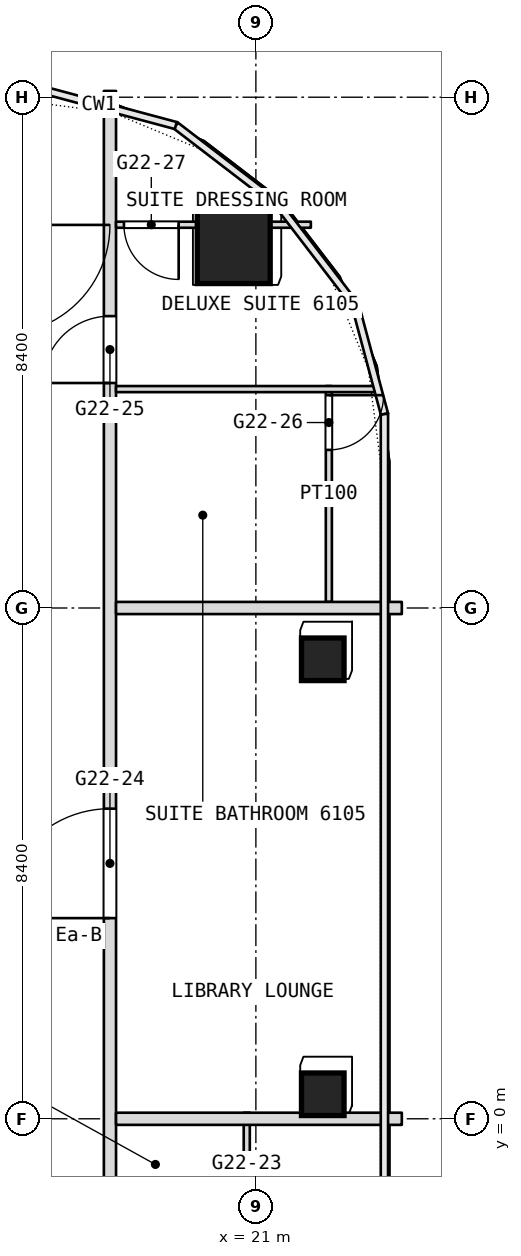
"""IFC4 building model, lengths in metres.
Left out: names, types, materials, properties, quantities, classifications, styles, units other than length and angle.
Written with IfcOpenShell. Run it as: python <this file> out.ifc"""

import sys

from ifc_helpers import new_model, si_unit, direction, frame, frame_2d, origin, origin_2d, place, context, subcontext, project, spatial, rectangle, extrude, element, fill, save


model = new_model("IFC4")
c1 = context("Model", 3, precision=1e-05, world=origin(), true_north=direction((0.0, 1.0)))
c2 = subcontext(c1, "Body", "Model", "MODEL_VIEW")
j1 = project(units=[si_unit("LENGTHUNIT", "METRE"), si_unit("PLANEANGLEUNIT", "RADIAN")], contexts=[c1])
p1 = place(None, origin())
s1 = spatial("IfcSite", under=j1, at=p1, CompositionType="ELEMENT")
p2 = place(p1, origin())
s2 = spatial("IfcBuilding", under=s1, at=p2, CompositionType="ELEMENT")
p3 = place(p2, frame((0.0, 0.0, 266.9)))
s3 = spatial("IfcBuildingStorey", under=s2, at=p3, CompositionType="ELEMENT", Elevation=266.9)
p4 = place(p3, frame((20.635, 14.335, 0.0), z_axis=(0.0, 0.0, 1.0), x_axis=(1.0, 0.0, 0.0)))
e1 = element("IfcColumn", 1, at=p4, inside=s3, PredefinedType="COLUMN", context=c2, shape_type="SweptSolid", body=[
    extrude(rectangle(XDim=1.2, YDim=1.2, at=origin_2d()), origin(), (0.0, 0.0, 1.0), 3.6),
])
for number, where, z_axis, x_axis in (
    (2, (22.1, 7.556, 0.0), (0.0, 0.0, 1.0), (1.0, 0.0, 0.0)),
    (3, (22.1, 0.403, 0.0), (0.0, 0.0, 1.0), (1.0, 0.0, 0.0)),
):
    element("IfcColumn", number, at=place(p3, frame(where, z_axis=z_axis, x_axis=x_axis)), inside=s3, PredefinedType="COLUMN", context=c2, shape_type="SweptSolid", body=[
        extrude(rectangle(XDim=0.7, YDim=0.7, at=origin_2d()), origin(), (0.0, 0.0, 1.0), 3.6),
    ])
p5 = place(p3, frame((22.2, 8.5, 0.0), z_axis=(0.0, 0.0, 1.0), x_axis=(0.0, 1.0, 0.0)))
e4 = element("IfcWall", 4, at=p5, inside=s3, PredefinedType="PARTITIONING", context=c2, shape_type="SweptSolid", body=[
    extrude(rectangle(XDim=3.55, YDim=0.1, at=frame_2d((1.775, 0.0))), origin(), (0.0, 0.0, 1.0), 3.0),
])
p6 = place(p5, frame((2.5, 0.0, 0.0)))
e5 = element("IfcOpeningElement", 5, at=p6, cuts=e4, PredefinedType="OPENING", context=c2, shape_type="SweptSolid", body=[
    extrude(rectangle(XDim=0.9, YDim=2.1, at=frame_2d((0.45, 1.05))), frame((0.0, 0.05, 0.0), z_axis=(0.0, -1.0, 0.0), x_axis=(1.0, 0.0, 0.0)), (0.0, 0.0, 1.0), 0.1),
])
p7 = place(p3, frame((20.85, -2.35, 0.0), z_axis=(0.0, 0.0, 1.0), x_axis=(0.0, 1.0, 0.0)))
e6 = element("IfcWall", 6, at=p7, inside=s3, PredefinedType="PARTITIONING", context=c2, shape_type="SweptSolid", body=[
    extrude(rectangle(XDim=2.45, YDim=0.1, at=frame_2d((1.225, 0.0))), origin(), (0.0, 0.0, 1.0), 3.34),
])
p8 = place(p7, frame((0.15, 0.0, 0.0)))
e7 = element("IfcOpeningElement", 7, at=p8, cuts=e6, PredefinedType="OPENING", context=c2, shape_type="SweptSolid", body=[
    extrude(rectangle(XDim=0.9, YDim=2.1, at=frame_2d((0.45, 1.05))), frame((0.0, 0.05, 0.0), z_axis=(0.0, -1.0, 0.0), x_axis=(1.0, 0.0, 0.0)), (0.0, 0.0, 1.0), 0.1),
])
p9 = place(p3, frame((18.6, -31.794, 0.0), z_axis=(0.0, 0.0, 1.0), x_axis=(0.0, 1.0, 0.0)))
e8 = element("IfcWall", 8, at=p9, inside=s3, PredefinedType="PARTITIONING", context=c2, shape_type="SweptSolid", body=[
    extrude(rectangle(XDim=48.697, YDim=0.2, at=frame_2d((24.349, 0.0))), origin(), (0.0, 0.0, 1.0), 3.34),
])
p10 = place(p9, frame((7.097, 0.0, 0.0)))
e9 = element("IfcOpeningElement", 9, at=p10, cuts=e8, PredefinedType="OPENING", context=c2, shape_type="SweptSolid", body=[
    extrude(rectangle(XDim=1.1, YDim=2.1, at=frame_2d((0.55, 1.05))), frame((0.0, 0.1, 0.0), z_axis=(0.0, -1.0, 0.0), x_axis=(1.0, 0.0, 0.0)), (0.0, 0.0, 1.0), 0.2),
])
p11 = place(p9, frame((18.594, 0.0, 0.0)))
e10 = element("IfcOpeningElement", 10, at=p11, cuts=e8, PredefinedType="OPENING", context=c2, shape_type="SweptSolid", body=[
    extrude(rectangle(XDim=1.1, YDim=2.1, at=frame_2d((0.55, 1.05))), frame((0.0, 0.1, 0.0), z_axis=(0.0, -1.0, 0.0), x_axis=(1.0, 0.0, 0.0)), (0.0, 0.0, 1.0), 0.2),
])
p12 = place(p9, frame((26.194, 0.0, 0.0)))
e11 = element("IfcOpeningElement", 11, at=p12, cuts=e8, PredefinedType="OPENING", context=c2, shape_type="SweptSolid", body=[
    extrude(rectangle(XDim=1.0, YDim=2.1, at=frame_2d((0.5, 1.05))), frame((0.0, 0.1, 0.0), z_axis=(0.0, -1.0, 0.0), x_axis=(1.0, 0.0, 0.0)), (0.0, 0.0, 1.0), 0.2),
])
p13 = place(p9, frame((27.994, 0.0, 0.0)))
e12 = element("IfcOpeningElement", 12, at=p13, cuts=e8, PredefinedType="OPENING", context=c2, shape_type="SweptSolid", body=[
    extrude(rectangle(XDim=1.0, YDim=2.1, at=frame_2d((0.5, 1.05))), frame((0.0, 0.1, 0.0), z_axis=(0.0, -1.0, 0.0), x_axis=(1.0, 0.0, 0.0)), (0.0, 0.0, 1.0), 0.2),
])
p14 = place(p9, frame((35.094, 0.0, 0.0)))
e13 = element("IfcOpeningElement", 13, at=p14, cuts=e8, PredefinedType="OPENING", context=c2, shape_type="SweptSolid", body=[
    extrude(rectangle(XDim=1.8, YDim=2.1, at=frame_2d((0.9, 1.05))), frame((0.0, 0.1, 0.0), z_axis=(0.0, -1.0, 0.0), x_axis=(1.0, 0.0, 0.0)), (0.0, 0.0, 1.0), 0.2),
])
p15 = place(p9, frame((43.894, 0.0, 0.0)))
e14 = element("IfcOpeningElement", 14, at=p15, cuts=e8, PredefinedType="OPENING", context=c2, shape_type="SweptSolid", body=[
    extrude(rectangle(XDim=1.1, YDim=2.1, at=frame_2d((0.55, 1.05))), frame((0.0, 0.1, 0.0), z_axis=(0.0, -1.0, 0.0), x_axis=(1.0, 0.0, 0.0)), (0.0, 0.0, 1.0), 0.2),
])
for number, where, z_axis, x_axis in (
    (15, (18.7, 0.0, 0.0), (0.0, 0.0, 1.0), (1.0, 0.0, 0.0)),
    (16, (18.7, 8.4, 0.0), (0.0, 0.0, 1.0), (1.0, 0.0, 0.0)),
):
    element("IfcWall", number, at=place(p3, frame(where, z_axis=z_axis, x_axis=x_axis)), inside=s3, PredefinedType="PARTITIONING", context=c2, shape_type="SweptSolid", body=[
        extrude(rectangle(XDim=4.7, YDim=0.2, at=frame_2d((2.35, 0.0))), origin(), (0.0, 0.0, 1.0), 3.0),
    ])
p16 = place(p3, frame((18.7, 12.0, 0.0), z_axis=(0.0, 0.0, 1.0), x_axis=(1.0, 0.0, 0.0)))
e17 = element("IfcWall", 17, at=p16, inside=s3, PredefinedType="PARTITIONING", context=c2, shape_type="SweptSolid", body=[
    extrude(rectangle(XDim=4.275, YDim=0.1, at=frame_2d((2.138, 0.0))), origin(), (0.0, 0.0, 1.0), 3.34),
])
p17 = place(p3, frame((18.7, 14.703, 0.0), z_axis=(0.0, 0.0, 1.0), x_axis=(1.0, 0.0, 0.0)))
e18 = element("IfcWall", 18, at=p17, inside=s3, PredefinedType="PARTITIONING", context=c2, shape_type="SweptSolid", body=[
    extrude(rectangle(XDim=1.335, YDim=0.1, at=frame_2d((0.667, 0.0))), origin(), (0.0, 0.0, 1.0), 3.34),
])
p18 = place(p17, frame((0.13, 0.0, 0.0)))
e19 = element("IfcOpeningElement", 19, at=p18, cuts=e18, PredefinedType="OPENING", context=c2, shape_type="SweptSolid", body=[
    extrude(rectangle(XDim=0.9, YDim=2.1, at=frame_2d((0.45, 1.05))), frame((0.0, 0.05, 0.0), z_axis=(0.0, -1.0, 0.0), x_axis=(1.0, 0.0, 0.0)), (0.0, 0.0, 1.0), 0.1),
])
p19 = place(p3, frame((21.236, 14.703, 0.0), z_axis=(0.0, 0.0, 1.0), x_axis=(1.0, 0.0, 0.0)))
e20 = element("IfcWall", 20, at=p19, inside=s3, PredefinedType="PARTITIONING", context=c2, shape_type="SweptSolid", body=[
    extrude(rectangle(XDim=0.668, YDim=0.1, at=frame_2d((0.334, 0.0))), origin(), (0.0, 0.0, 1.0), 3.34),
])
p20 = place(p6, origin())
e21 = element("IfcDoor", 21, at=p20, inside=s3, OperationType="SINGLE_SWING_RIGHT", PredefinedType="DOOR", context=c2, shape_type="SweptSolid", body=[
    extrude(rectangle(XDim=0.9, YDim=2.1, at=frame_2d((0.45, 1.05))), frame((0.0, 0.025, 0.0), z_axis=(0.0, -1.0, 0.0), x_axis=(1.0, 0.0, 0.0)), (0.0, 0.0, 1.0), 0.05),
])
fill(e5, e21)
p21 = place(p14, origin())
e22 = element("IfcDoor", 22, at=p21, inside=s3, OperationType="DOUBLE_DOOR_SINGLE_SWING", PredefinedType="DOOR", context=c2, shape_type="SweptSolid", body=[
    extrude(rectangle(XDim=1.8, YDim=2.1, at=frame_2d((0.9, 1.05))), frame((0.0, 0.025, 0.0), z_axis=(0.0, -1.0, 0.0), x_axis=(1.0, 0.0, 0.0)), (0.0, 0.0, 1.0), 0.05),
])
fill(e13, e22)
p22 = place(p15, origin())
e23 = element("IfcDoor", 23, at=p22, inside=s3, OperationType="SINGLE_SWING_RIGHT", PredefinedType="DOOR", context=c2, shape_type="SweptSolid", body=[
    extrude(rectangle(XDim=1.1, YDim=2.1, at=frame_2d((0.55, 1.05))), frame((0.0, 0.025, 0.0), z_axis=(0.0, -1.0, 0.0), x_axis=(1.0, 0.0, 0.0)), (0.0, 0.0, 1.0), 0.05),
])
fill(e14, e23)
p23 = place(p18, origin())
e24 = element("IfcDoor", 24, at=p23, inside=s3, OperationType="SINGLE_SWING_RIGHT", PredefinedType="DOOR", context=c2, shape_type="SweptSolid", body=[
    extrude(rectangle(XDim=0.9, YDim=2.1, at=frame_2d((0.45, 1.05))), frame((0.0, 0.025, 0.0), z_axis=(0.0, -1.0, 0.0), x_axis=(1.0, 0.0, 0.0)), (0.0, 0.0, 1.0), 0.05),
])
fill(e19, e24)
save(model, sys.argv[1])
